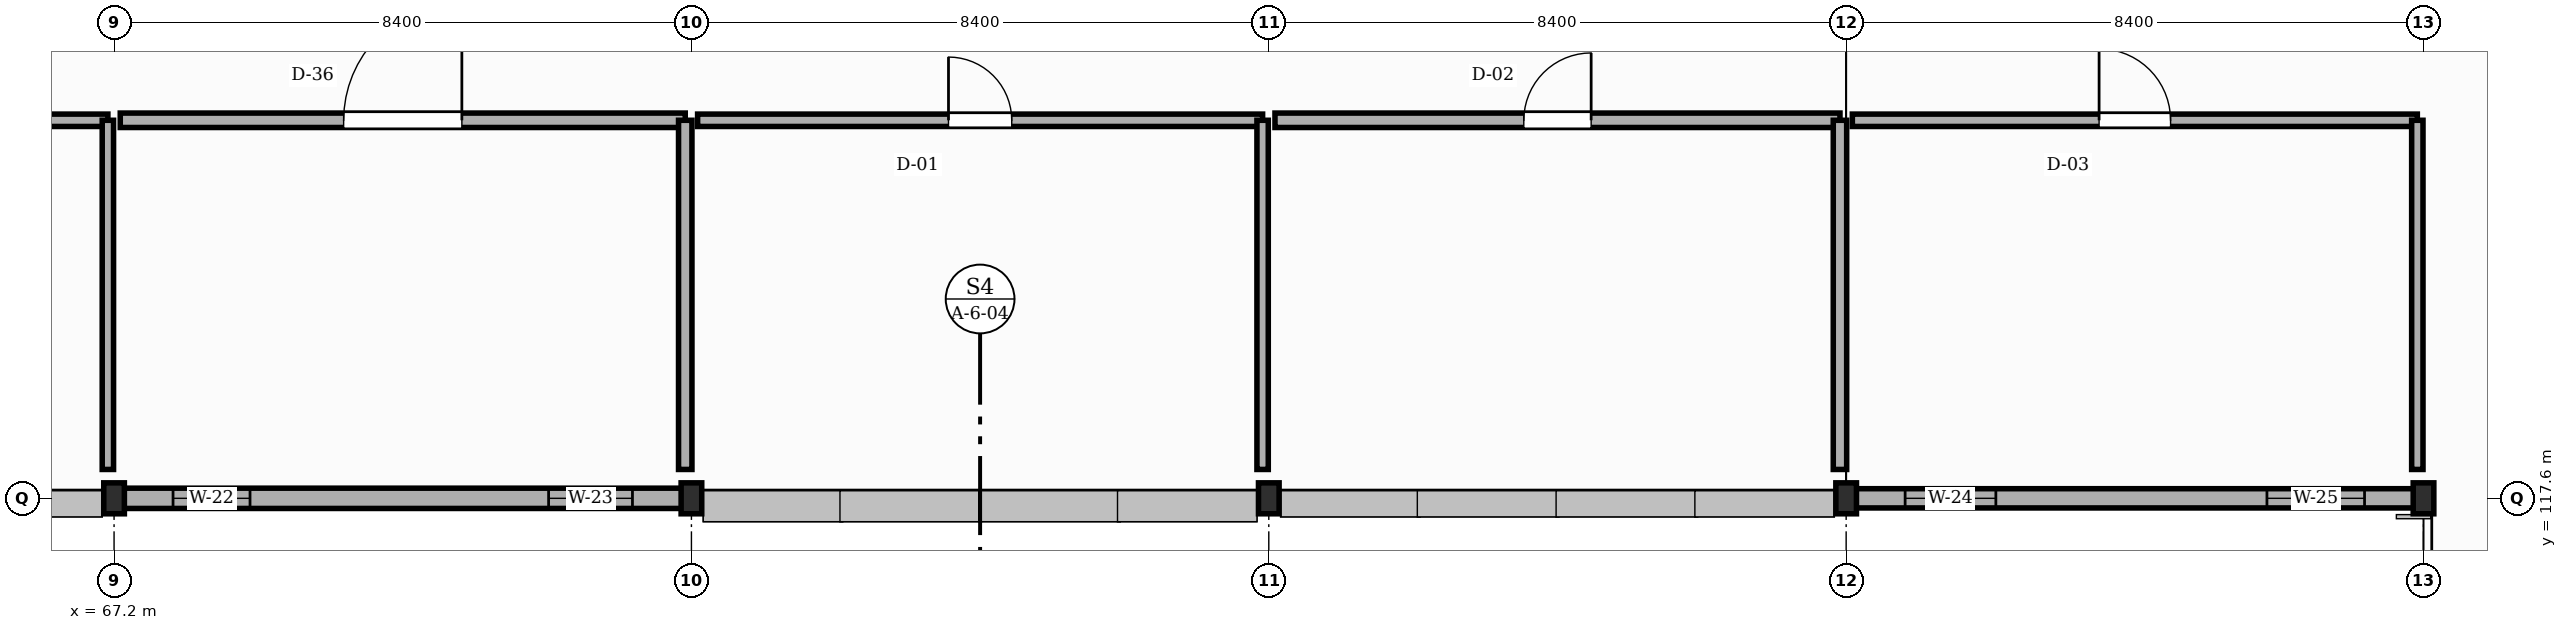
"""IFC4 building model, lengths in metres.
Left out: names, types, materials, properties, quantities, classifications, styles, units other than length and angle.
Written with IfcOpenShell. Run it as: python <this file> out.ifc"""

import sys

from ifc_helpers import new_model, si_unit, direction, frame, frame_2d, origin, origin_2d, place, context, subcontext, project, spatial, rectangle, i_section, extrude, element, fill, save


model = new_model("IFC4")
c1 = context("Model", 3, precision=1e-05, world=origin(), true_north=direction((0.0, 1.0)))
c2 = subcontext(c1, "Body", "Model", "MODEL_VIEW")
j1 = project(units=[si_unit("LENGTHUNIT", "METRE"), si_unit("PLANEANGLEUNIT", "RADIAN")], contexts=[c1])
p1 = place(None, origin())
s1 = spatial("IfcSite", under=j1, at=p1, CompositionType="ELEMENT")
p2 = place(p1, origin())
s2 = spatial("IfcBuilding", under=s1, at=p2, CompositionType="ELEMENT")
p3 = place(p2, frame((0.0, 0.0, 13.95)))
s3 = spatial("IfcBuildingStorey", under=s2, at=p3, CompositionType="ELEMENT", Elevation=13.95)
for number, where, z_axis, x_axis in (
    (1, (67.2, 117.6, 0.0), (0.0, 0.0, 1.0), (1.0, 0.0, 0.0)),
    (2, (75.6, 117.6, 0.0), (0.0, 0.0, 1.0), (1.0, 0.0, 0.0)),
    (3, (84.0, 117.6, 0.0), (0.0, 0.0, 1.0), (1.0, 0.0, 0.0)),
    (4, (92.4, 117.6, 0.0), (0.0, 0.0, 1.0), (1.0, 0.0, 0.0)),
    (5, (100.8, 117.6, 0.0), (0.0, 0.0, 1.0), (1.0, 0.0, 0.0)),
):
    element("IfcColumn", number, at=place(p3, frame(where, z_axis=z_axis, x_axis=x_axis)), inside=s3, PredefinedType="COLUMN", context=c2, shape_type="SweptSolid", body=[
        extrude(i_section(OverallWidth=0.3, OverallDepth=0.45, WebThickness=0.014, FlangeThickness=0.026, FilletRadius=0.027, at=origin_2d()), origin(), (0.0, 0.0, 1.0), 4.05),
    ])
p4 = place(p3, frame((67.208, 117.6, 0.0), z_axis=(0.0, 0.0, 1.0), x_axis=(1.0, 0.0, 0.0)))
e6 = element("IfcWall", 6, at=p4, inside=s3, PredefinedType="STANDARD", context=c2, shape_type="SweptSolid", body=[
    extrude(rectangle(XDim=8.384, YDim=0.295, at=frame_2d((4.192, 0.0))), origin(), (0.0, 0.0, 1.0), 3.487),
])
p5 = place(p4, frame((0.85, 0.0, 0.9)))
e7 = element("IfcOpeningElement", 7, at=p5, cuts=e6, PredefinedType="OPENING", context=c2, shape_type="SweptSolid", body=[
    extrude(rectangle(XDim=1.12, YDim=1.45, at=frame_2d((0.56, 0.725))), frame((0.0, 0.157, 0.0), z_axis=(0.0, -1.0, 0.0), x_axis=(1.0, 0.0, 0.0)), (0.0, 0.0, 1.0), 0.315),
])
p6 = place(p4, frame((6.314, 0.0, 0.9)))
e8 = element("IfcOpeningElement", 8, at=p6, cuts=e6, PredefinedType="OPENING", context=c2, shape_type="SweptSolid", body=[
    extrude(rectangle(XDim=1.22, YDim=1.45, at=frame_2d((0.61, 0.725))), frame((0.0, 0.157, 0.0), z_axis=(0.0, -1.0, 0.0), x_axis=(1.0, 0.0, 0.0)), (0.0, 0.0, 1.0), 0.315),
])
p7 = place(p3, frame((92.408, 117.6, 0.0), z_axis=(0.0, 0.0, 1.0), x_axis=(1.0, 0.0, 0.0)))
e9 = element("IfcWall", 9, at=p7, inside=s3, PredefinedType="STANDARD", context=c2, shape_type="SweptSolid", body=[
    extrude(rectangle(XDim=8.384, YDim=0.28, at=frame_2d((4.192, 0.0))), origin(), (0.0, 0.0, 1.0), 3.517),
])
p8 = place(p7, frame((0.85, 0.0, 0.9)))
e10 = element("IfcOpeningElement", 10, at=p8, cuts=e9, PredefinedType="OPENING", context=c2, shape_type="SweptSolid", body=[
    extrude(rectangle(XDim=1.32, YDim=1.45, at=frame_2d((0.66, 0.725))), frame((0.0, 0.15, 0.0), z_axis=(0.0, -1.0, 0.0), x_axis=(1.0, 0.0, 0.0)), (0.0, 0.0, 1.0), 0.3),
])
p9 = place(p7, frame((6.114, 0.0, 0.9)))
e11 = element("IfcOpeningElement", 11, at=p9, cuts=e9, PredefinedType="OPENING", context=c2, shape_type="SweptSolid", body=[
    extrude(rectangle(XDim=1.42, YDim=1.45, at=frame_2d((0.71, 0.725))), frame((0.0, 0.15, 0.0), z_axis=(0.0, -1.0, 0.0), x_axis=(1.0, 0.0, 0.0)), (0.0, 0.0, 1.0), 0.3),
])
p10 = place(p3, frame((58.89, 123.1, -0.004), z_axis=(0.0, 0.0, 1.0), x_axis=(1.0, 0.0, 0.0)))
e12 = element("IfcWall", 12, at=p10, inside=s3, PredefinedType="STANDARD", context=c2, shape_type="SweptSolid", body=[
    extrude(rectangle(XDim=8.22, YDim=0.18, at=frame_2d((4.11, 0.0))), origin(), (0.0, 0.0, 1.0), 3.854),
])
p11 = place(p10, frame((3.34, 0.0, 0.0)))
e13 = element("IfcOpeningElement", 13, at=p11, cuts=e12, PredefinedType="OPENING", context=c2, shape_type="SweptSolid", body=[
    extrude(rectangle(XDim=1.54, YDim=2.3, at=frame_2d((0.77, 1.15))), frame((0.0, 0.1, 0.0), z_axis=(0.0, -1.0, 0.0), x_axis=(1.0, 0.0, 0.0)), (0.0, 0.0, 1.0), 0.2),
])
p12 = place(p3, frame((67.11, 123.1, -0.004), z_axis=(0.0, 0.0, 1.0), x_axis=(0.0, -1.0, 0.0)))
e14 = element("IfcWall", 14, at=p12, inside=s3, PredefinedType="STANDARD", context=c2, shape_type="SweptSolid", body=[
    extrude(rectangle(XDim=5.08, YDim=0.165, at=frame_2d((2.54, 0.0))), origin(), (0.0, 0.0, 1.0), 3.451),
])
p13 = place(p3, frame((67.29, 123.1, -0.004), z_axis=(0.0, 0.0, 1.0), x_axis=(1.0, 0.0, 0.0)))
e15 = element("IfcWall", 15, at=p13, inside=s3, PredefinedType="STANDARD", context=c2, shape_type="SweptSolid", body=[
    extrude(rectangle(XDim=8.22, YDim=0.21, at=frame_2d((4.11, 0.0))), origin(), (0.0, 0.0, 1.0), 3.854),
])
p14 = place(p13, frame((3.25, 0.0, 0.0)))
e16 = element("IfcOpeningElement", 16, at=p14, cuts=e15, PredefinedType="OPENING", context=c2, shape_type="SweptSolid", body=[
    extrude(rectangle(XDim=1.72, YDim=2.3, at=frame_2d((0.86, 1.15))), frame((0.0, 0.115, 0.0), z_axis=(0.0, -1.0, 0.0), x_axis=(1.0, 0.0, 0.0)), (0.0, 0.0, 1.0), 0.23),
])
p15 = place(p3, frame((75.51, 123.1, -0.004), z_axis=(0.0, 0.0, 1.0), x_axis=(0.0, -1.0, 0.0)))
e17 = element("IfcWall", 17, at=p15, inside=s3, PredefinedType="STANDARD", context=c2, shape_type="SweptSolid", body=[
    extrude(rectangle(XDim=5.08, YDim=0.195, at=frame_2d((2.54, 0.0))), origin(), (0.0, 0.0, 1.0), 3.501),
])
p16 = place(p3, frame((75.69, 123.1, -0.004), z_axis=(0.0, 0.0, 1.0), x_axis=(1.0, 0.0, 0.0)))
e18 = element("IfcWall", 18, at=p16, inside=s3, PredefinedType="STANDARD", context=c2, shape_type="SweptSolid", body=[
    extrude(rectangle(XDim=8.22, YDim=0.18, at=frame_2d((4.11, 0.0))), origin(), (0.0, 0.0, 1.0), 3.854),
])
p17 = place(p16, frame((3.65, 0.0, 0.0)))
e19 = element("IfcOpeningElement", 19, at=p17, cuts=e18, PredefinedType="OPENING", context=c2, shape_type="SweptSolid", body=[
    extrude(rectangle(XDim=0.92, YDim=2.06, at=frame_2d((0.46, 1.03))), frame((0.0, 0.1, 0.0), z_axis=(0.0, -1.0, 0.0), x_axis=(1.0, 0.0, 0.0)), (0.0, 0.0, 1.0), 0.2),
])
p18 = place(p3, frame((83.91, 123.1, -0.004), z_axis=(0.0, 0.0, 1.0), x_axis=(0.0, -1.0, 0.0)))
e20 = element("IfcWall", 20, at=p18, inside=s3, PredefinedType="STANDARD", context=c2, shape_type="SweptSolid", body=[
    extrude(rectangle(XDim=5.08, YDim=0.165, at=frame_2d((2.54, 0.0))), origin(), (0.0, 0.0, 1.0), 3.541),
])
p19 = place(p3, frame((84.09, 123.1, -0.004), z_axis=(0.0, 0.0, 1.0), x_axis=(1.0, 0.0, 0.0)))
e21 = element("IfcWall", 21, at=p19, inside=s3, PredefinedType="STANDARD", context=c2, shape_type="SweptSolid", body=[
    extrude(rectangle(XDim=8.22, YDim=0.21, at=frame_2d((4.11, 0.0))), origin(), (0.0, 0.0, 1.0), 3.854),
])
p20 = place(p19, frame((3.62, 0.0, 0.0)))
e22 = element("IfcOpeningElement", 22, at=p20, cuts=e21, PredefinedType="OPENING", context=c2, shape_type="SweptSolid", body=[
    extrude(rectangle(XDim=0.98, YDim=2.06, at=frame_2d((0.49, 1.03))), frame((0.0, 0.115, 0.0), z_axis=(0.0, -1.0, 0.0), x_axis=(1.0, 0.0, 0.0)), (0.0, 0.0, 1.0), 0.23),
])
p21 = place(p3, frame((92.31, 123.1, -0.004), z_axis=(0.0, 0.0, 1.0), x_axis=(0.0, -1.0, 0.0)))
e23 = element("IfcWall", 23, at=p21, inside=s3, PredefinedType="STANDARD", context=c2, shape_type="SweptSolid", body=[
    extrude(rectangle(XDim=5.08, YDim=0.195, at=frame_2d((2.54, 0.0))), origin(), (0.0, 0.0, 1.0), 3.251),
])
p22 = place(p3, frame((92.49, 123.1, -0.004), z_axis=(0.0, 0.0, 1.0), x_axis=(1.0, 0.0, 0.0)))
e24 = element("IfcWall", 24, at=p22, inside=s3, PredefinedType="STANDARD", context=c2, shape_type="SweptSolid", body=[
    extrude(rectangle(XDim=8.22, YDim=0.18, at=frame_2d((4.11, 0.0))), origin(), (0.0, 0.0, 1.0), 3.854),
])
p23 = place(p22, frame((3.59, 0.0, 0.0)))
e25 = element("IfcOpeningElement", 25, at=p23, cuts=e24, PredefinedType="OPENING", context=c2, shape_type="SweptSolid", body=[
    extrude(rectangle(XDim=1.04, YDim=2.06, at=frame_2d((0.52, 1.03))), frame((0.0, 0.1, 0.0), z_axis=(0.0, -1.0, 0.0), x_axis=(1.0, 0.0, 0.0)), (0.0, 0.0, 1.0), 0.2),
])
p24 = place(p3, frame((100.71, 123.1, -0.004), z_axis=(0.0, 0.0, 1.0), x_axis=(0.0, -1.0, 0.0)))
e26 = element("IfcWall", 26, at=p24, inside=s3, PredefinedType="STANDARD", context=c2, shape_type="SweptSolid", body=[
    extrude(rectangle(XDim=5.08, YDim=0.165, at=frame_2d((2.54, 0.0))), origin(), (0.0, 0.0, 1.0), 3.361),
])
p25 = place(p5, origin())
e27 = element("IfcWindow", 27, at=p25, inside=s3, PartitioningType="SINGLE_PANEL", PredefinedType="WINDOW", context=c2, shape_type="SweptSolid", body=[
    extrude(rectangle(XDim=1.12, YDim=1.45, at=frame_2d((0.56, 0.725))), frame((0.0, 0.03, 0.0), z_axis=(0.0, -1.0, 0.0), x_axis=(1.0, 0.0, 0.0)), (0.0, 0.0, 1.0), 0.06),
])
fill(e7, e27)
p26 = place(p6, origin())
e28 = element("IfcWindow", 28, at=p26, inside=s3, PartitioningType="SINGLE_PANEL", PredefinedType="WINDOW", context=c2, shape_type="SweptSolid", body=[
    extrude(rectangle(XDim=1.22, YDim=1.45, at=frame_2d((0.61, 0.725))), frame((0.0, 0.03, 0.0), z_axis=(0.0, -1.0, 0.0), x_axis=(1.0, 0.0, 0.0)), (0.0, 0.0, 1.0), 0.06),
])
fill(e8, e28)
p27 = place(p8, origin())
e29 = element("IfcWindow", 29, at=p27, inside=s3, PartitioningType="SINGLE_PANEL", PredefinedType="WINDOW", context=c2, shape_type="SweptSolid", body=[
    extrude(rectangle(XDim=1.32, YDim=1.45, at=frame_2d((0.66, 0.725))), frame((0.0, 0.03, 0.0), z_axis=(0.0, -1.0, 0.0), x_axis=(1.0, 0.0, 0.0)), (0.0, 0.0, 1.0), 0.06),
])
fill(e10, e29)
p28 = place(p9, origin())
e30 = element("IfcWindow", 30, at=p28, inside=s3, PartitioningType="SINGLE_PANEL", PredefinedType="WINDOW", context=c2, shape_type="SweptSolid", body=[
    extrude(rectangle(XDim=1.42, YDim=1.45, at=frame_2d((0.71, 0.725))), frame((0.0, 0.03, 0.0), z_axis=(0.0, -1.0, 0.0), x_axis=(1.0, 0.0, 0.0)), (0.0, 0.0, 1.0), 0.06),
])
fill(e11, e30)
p29 = place(p14, origin())
e31 = element("IfcDoor", 31, at=p29, inside=s3, OperationType="SINGLE_SWING_RIGHT", PredefinedType="DOOR", context=c2, shape_type="SweptSolid", body=[
    extrude(rectangle(XDim=1.72, YDim=2.3, at=frame_2d((0.86, 1.15))), frame((0.0, 0.025, 0.0), z_axis=(0.0, -1.0, 0.0), x_axis=(1.0, 0.0, 0.0)), (0.0, 0.0, 1.0), 0.05),
])
fill(e16, e31)
p30 = place(p17, origin())
e32 = element("IfcDoor", 32, at=p30, inside=s3, OperationType="SINGLE_SWING_LEFT", PredefinedType="DOOR", context=c2, shape_type="SweptSolid", body=[
    extrude(rectangle(XDim=0.92, YDim=2.06, at=frame_2d((0.46, 1.03))), frame((0.0, 0.025, 0.0), z_axis=(0.0, -1.0, 0.0), x_axis=(1.0, 0.0, 0.0)), (0.0, 0.0, 1.0), 0.05),
])
fill(e19, e32)
p31 = place(p20, origin())
e33 = element("IfcDoor", 33, at=p31, inside=s3, OperationType="SINGLE_SWING_RIGHT", PredefinedType="DOOR", context=c2, shape_type="SweptSolid", body=[
    extrude(rectangle(XDim=0.98, YDim=2.06, at=frame_2d((0.49, 1.03))), frame((0.0, 0.025, 0.0), z_axis=(0.0, -1.0, 0.0), x_axis=(1.0, 0.0, 0.0)), (0.0, 0.0, 1.0), 0.05),
])
fill(e22, e33)
p32 = place(p23, origin())
e34 = element("IfcDoor", 34, at=p32, inside=s3, OperationType="SINGLE_SWING_LEFT", PredefinedType="DOOR", context=c2, shape_type="SweptSolid", body=[
    extrude(rectangle(XDim=1.04, YDim=2.06, at=frame_2d((0.52, 1.03))), frame((0.0, 0.025, 0.0), z_axis=(0.0, -1.0, 0.0), x_axis=(1.0, 0.0, 0.0)), (0.0, 0.0, 1.0), 0.05),
])
fill(e25, e34)
save(model, sys.argv[1])
